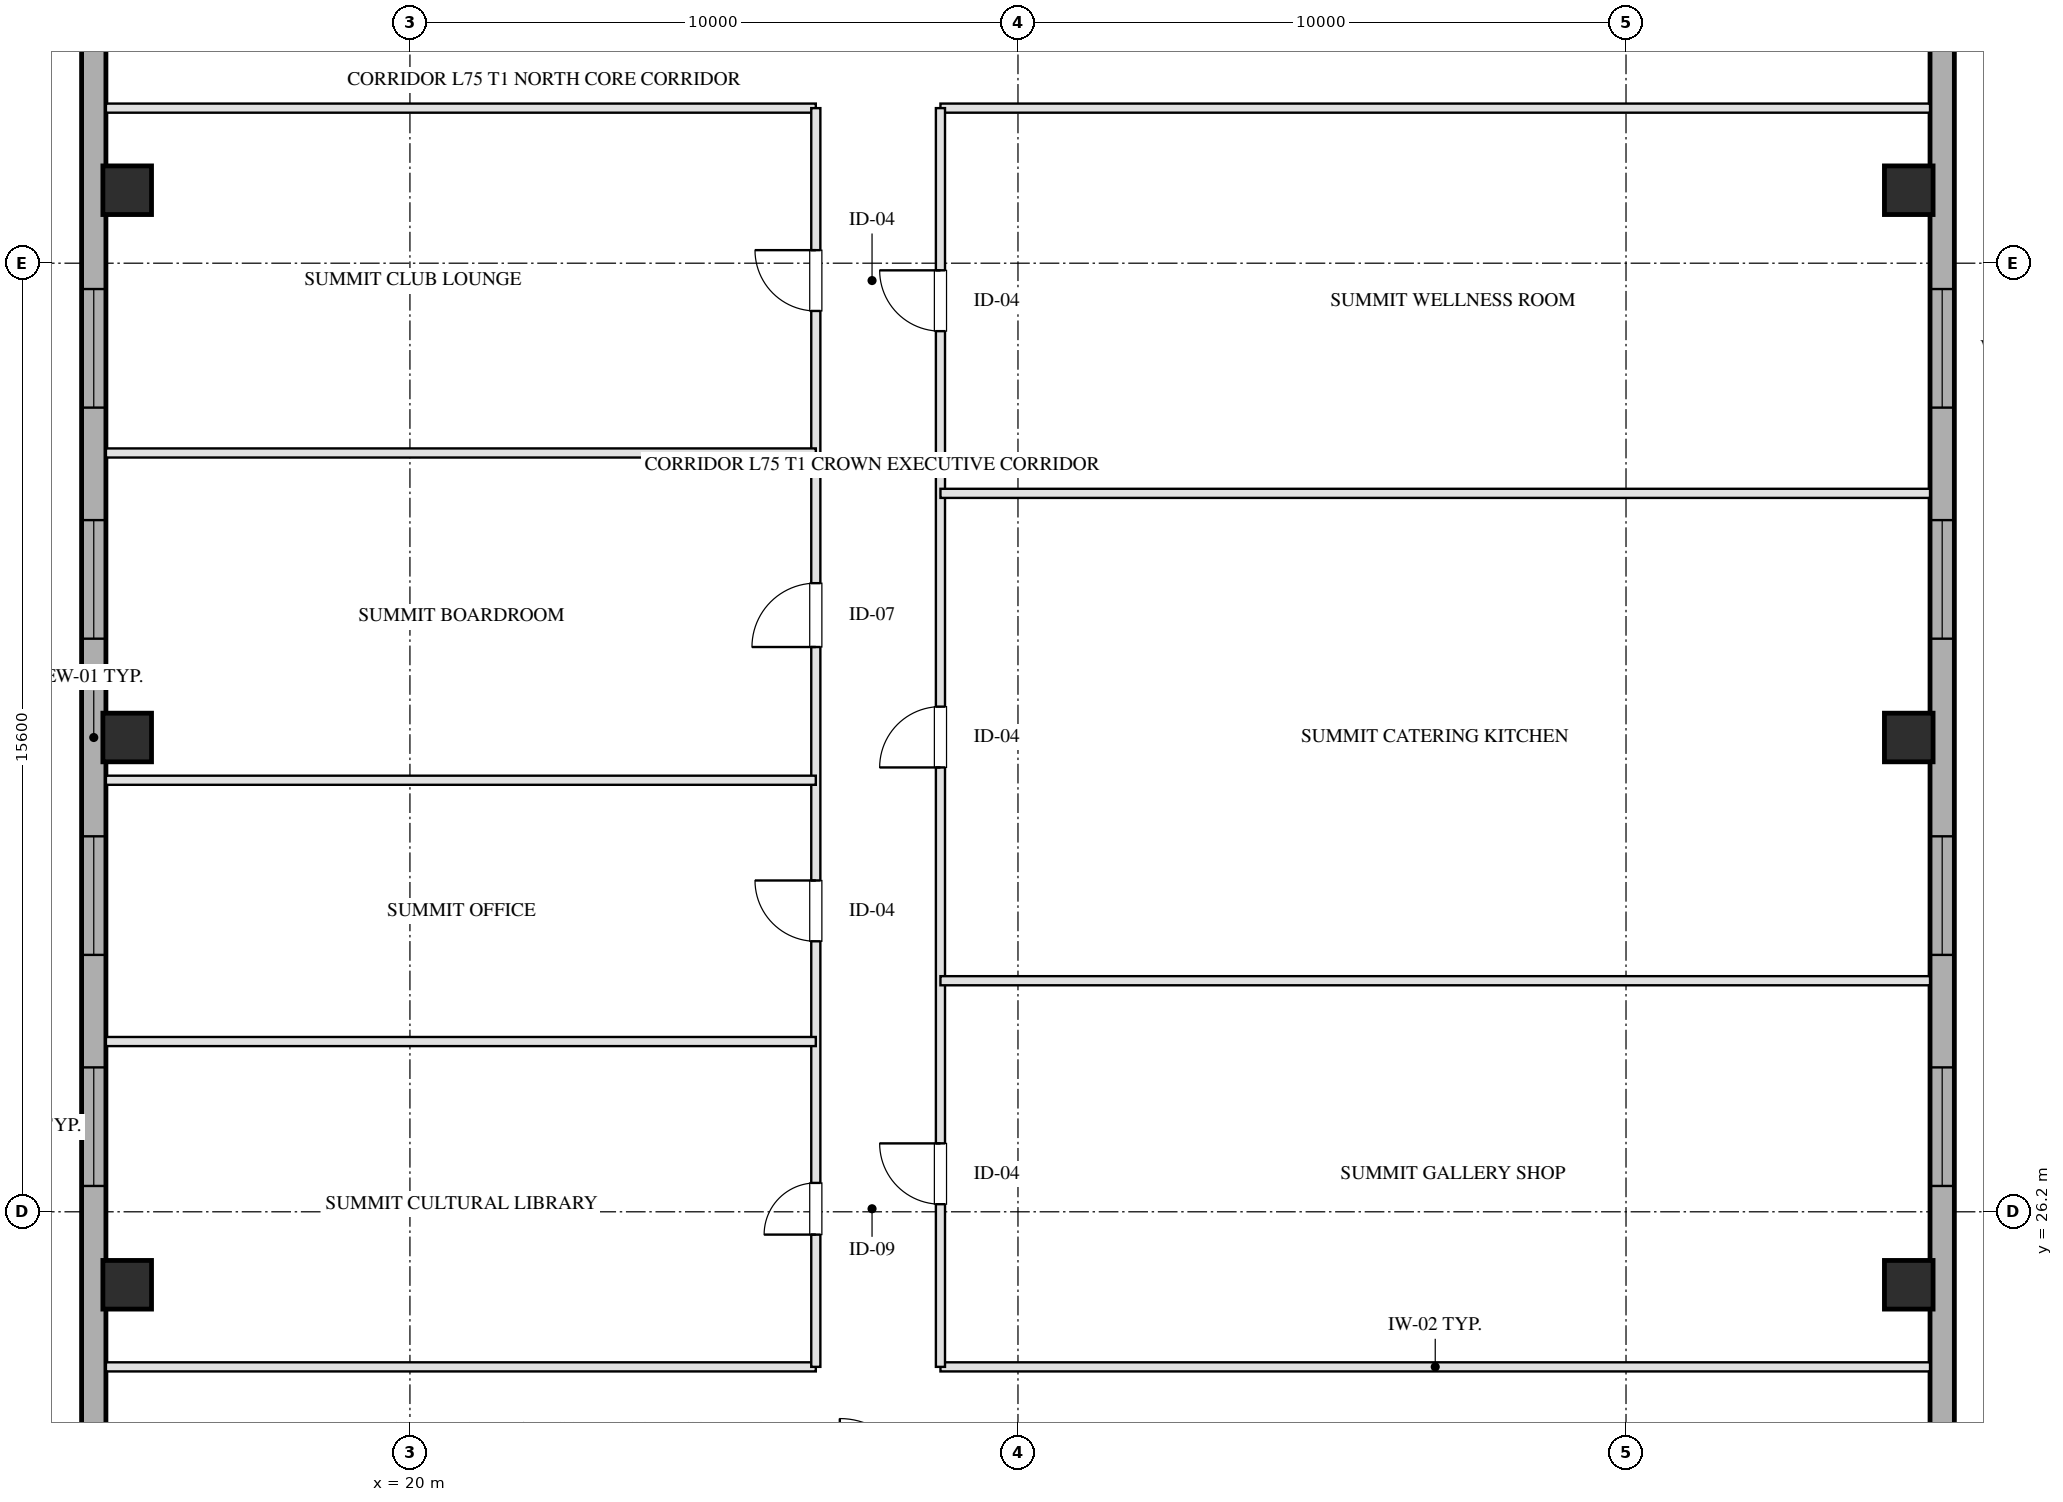
"""IFC4 building model, lengths in metres.
Left out: names, types, materials, properties, quantities, classifications, styles, units other than length and angle.
Written with IfcOpenShell. Run it as: python <this file> out.ifc"""

import sys

from ifc_helpers import new_model, si_unit, direction, frame, frame_2d, origin, origin_2d, place, context, subcontext, project, spatial, rectangle, hollow_rectangle, extrude, element, fill, save


model = new_model("IFC4")
c1 = context("Model", 3, precision=1e-05, world=origin(), true_north=direction((0.0, 1.0)))
c2 = subcontext(c1, "Body", "Model", "MODEL_VIEW")
j1 = project(units=[si_unit("LENGTHUNIT", "METRE"), si_unit("PLANEANGLEUNIT", "RADIAN")], contexts=[c1])
p1 = place(None, origin())
s1 = spatial("IfcSite", under=j1, at=p1, CompositionType="ELEMENT")
p2 = place(p1, origin())
s2 = spatial("IfcBuilding", under=s1, at=p2, CompositionType="ELEMENT")
p3 = place(p2, frame((0.0, 0.0, 272.8)))
s3 = spatial("IfcBuildingStorey", under=s2, at=p3, CompositionType="ELEMENT", Elevation=272.8)
for number, where, z_axis, x_axis in (
    (1, (15.35, 25.0, 0.0), (0.0, 0.0, 1.0), (1.0, 0.0, 0.0)),
    (2, (15.35, 34.0, 0.0), (0.0, 0.0, 1.0), (1.0, 0.0, 0.0)),
    (3, (15.35, 43.0, 0.0), (0.0, 0.0, 1.0), (1.0, 0.0, 0.0)),
    (4, (44.65, 25.0, 0.0), (0.0, 0.0, 1.0), (1.0, 0.0, 0.0)),
    (5, (44.65, 34.0, 0.0), (0.0, 0.0, 1.0), (1.0, 0.0, 0.0)),
    (6, (44.65, 43.0, 0.0), (0.0, 0.0, 1.0), (1.0, 0.0, 0.0)),
):
    element("IfcColumn", number, at=place(p3, frame(where, z_axis=z_axis, x_axis=x_axis)), inside=s3, PredefinedType="COLUMN", context=c2, shape_type="SweptSolid", body=[
        extrude(hollow_rectangle(XDim=0.8, YDim=0.8, WallThickness=0.028, at=origin_2d()), origin(), (0.0, 0.0, 1.0), 3.201),
    ])
p4 = place(p3, frame((14.8, 13.1, 0.0), z_axis=(0.0, 0.0, 1.0), x_axis=(0.0, 1.0, 0.0)))
e7 = element("IfcWall", 7, at=p4, inside=s3, PredefinedType="SOLIDWALL", context=c2, shape_type="SweptSolid", body=[
    extrude(rectangle(XDim=41.8, YDim=0.4, at=frame_2d((20.9, 0.0))), origin(), (0.0, 0.0, 1.0), 2.36),
])
p5 = place(p4, frame((13.525, 0.0, 0.75)))
e8 = element("IfcOpeningElement", 8, at=p5, cuts=e7, PredefinedType="OPENING", context=c2, shape_type="SweptSolid", body=[
    extrude(rectangle(XDim=1.95, YDim=1.21, at=frame_2d((0.975, 0.605))), frame((0.0, 0.21, 0.0), z_axis=(0.0, -1.0, 0.0), x_axis=(1.0, 0.0, 0.0)), (0.0, 0.0, 1.0), 0.42),
])
p6 = place(p4, frame((17.325, 0.0, 0.75)))
e9 = element("IfcOpeningElement", 9, at=p6, cuts=e7, PredefinedType="OPENING", context=c2, shape_type="SweptSolid", body=[
    extrude(rectangle(XDim=1.95, YDim=1.21, at=frame_2d((0.975, 0.605))), frame((0.0, 0.21, 0.0), z_axis=(0.0, -1.0, 0.0), x_axis=(1.0, 0.0, 0.0)), (0.0, 0.0, 1.0), 0.42),
])
p7 = place(p4, frame((22.525, 0.0, 0.75)))
e10 = element("IfcOpeningElement", 10, at=p7, cuts=e7, PredefinedType="OPENING", context=c2, shape_type="SweptSolid", body=[
    extrude(rectangle(XDim=1.95, YDim=1.21, at=frame_2d((0.975, 0.605))), frame((0.0, 0.21, 0.0), z_axis=(0.0, -1.0, 0.0), x_axis=(1.0, 0.0, 0.0)), (0.0, 0.0, 1.0), 0.42),
])
p8 = place(p4, frame((26.325, 0.0, 0.75)))
e11 = element("IfcOpeningElement", 11, at=p8, cuts=e7, PredefinedType="OPENING", context=c2, shape_type="SweptSolid", body=[
    extrude(rectangle(XDim=1.95, YDim=1.21, at=frame_2d((0.975, 0.605))), frame((0.0, 0.21, 0.0), z_axis=(0.0, -1.0, 0.0), x_axis=(1.0, 0.0, 0.0)), (0.0, 0.0, 1.0), 0.42),
])
p9 = place(p3, frame((45.2, 54.9, 0.0), z_axis=(0.0, 0.0, 1.0), x_axis=(0.0, -1.0, 0.0)))
e12 = element("IfcWall", 12, at=p9, inside=s3, PredefinedType="SOLIDWALL", context=c2, shape_type="SweptSolid", body=[
    extrude(rectangle(XDim=41.8, YDim=0.4, at=frame_2d((20.9, 0.0))), origin(), (0.0, 0.0, 1.0), 2.36),
])
p10 = place(p9, frame((26.325, 0.0, 0.75)))
e13 = element("IfcOpeningElement", 13, at=p10, cuts=e12, PredefinedType="OPENING", context=c2, shape_type="SweptSolid", body=[
    extrude(rectangle(XDim=1.95, YDim=1.21, at=frame_2d((0.975, 0.605))), frame((0.0, 0.21, 0.0), z_axis=(0.0, -1.0, 0.0), x_axis=(1.0, 0.0, 0.0)), (0.0, 0.0, 1.0), 0.42),
])
p11 = place(p9, frame((22.525, 0.0, 0.75)))
e14 = element("IfcOpeningElement", 14, at=p11, cuts=e12, PredefinedType="OPENING", context=c2, shape_type="SweptSolid", body=[
    extrude(rectangle(XDim=1.95, YDim=1.21, at=frame_2d((0.975, 0.605))), frame((0.0, 0.21, 0.0), z_axis=(0.0, -1.0, 0.0), x_axis=(1.0, 0.0, 0.0)), (0.0, 0.0, 1.0), 0.42),
])
p12 = place(p9, frame((17.325, 0.0, 0.75)))
e15 = element("IfcOpeningElement", 15, at=p12, cuts=e12, PredefinedType="OPENING", context=c2, shape_type="SweptSolid", body=[
    extrude(rectangle(XDim=1.95, YDim=1.21, at=frame_2d((0.975, 0.605))), frame((0.0, 0.21, 0.0), z_axis=(0.0, -1.0, 0.0), x_axis=(1.0, 0.0, 0.0)), (0.0, 0.0, 1.0), 0.42),
])
p13 = place(p9, frame((13.525, 0.0, 0.75)))
e16 = element("IfcOpeningElement", 16, at=p13, cuts=e12, PredefinedType="OPENING", context=c2, shape_type="SweptSolid", body=[
    extrude(rectangle(XDim=1.95, YDim=1.21, at=frame_2d((0.975, 0.605))), frame((0.0, 0.21, 0.0), z_axis=(0.0, -1.0, 0.0), x_axis=(1.0, 0.0, 0.0)), (0.0, 0.0, 1.0), 0.42),
])
p14 = place(p3, frame((15.0, 23.65, 0.0), z_axis=(0.0, 0.0, 1.0), x_axis=(1.0, 0.0, 0.0)))
e17 = element("IfcWall", 17, at=p14, inside=s3, PredefinedType="PARTITIONING", context=c2, shape_type="SweptSolid", body=[
    extrude(rectangle(XDim=11.675, YDim=0.15, at=frame_2d((5.837, 0.0))), origin(), (0.0, 0.0, 1.0), 2.925),
])
p15 = place(p3, frame((28.725, 23.65, 0.0), z_axis=(0.0, 0.0, 1.0), x_axis=(1.0, 0.0, 0.0)))
e18 = element("IfcWall", 18, at=p15, inside=s3, PredefinedType="PARTITIONING", context=c2, shape_type="SweptSolid", body=[
    extrude(rectangle(XDim=16.275, YDim=0.15, at=frame_2d((8.137, 0.0))), origin(), (0.0, 0.0, 1.0), 2.925),
])
p16 = place(p3, frame((15.0, 44.35, 0.0), z_axis=(0.0, 0.0, 1.0), x_axis=(1.0, 0.0, 0.0)))
e19 = element("IfcWall", 19, at=p16, inside=s3, PredefinedType="PARTITIONING", context=c2, shape_type="SweptSolid", body=[
    extrude(rectangle(XDim=11.675, YDim=0.15, at=frame_2d((5.837, 0.0))), origin(), (0.0, 0.0, 1.0), 2.925),
])
p17 = place(p3, frame((28.725, 44.35, 0.0), z_axis=(0.0, 0.0, 1.0), x_axis=(1.0, 0.0, 0.0)))
e20 = element("IfcWall", 20, at=p17, inside=s3, PredefinedType="PARTITIONING", context=c2, shape_type="SweptSolid", body=[
    extrude(rectangle(XDim=16.275, YDim=0.15, at=frame_2d((8.137, 0.0))), origin(), (0.0, 0.0, 1.0), 2.925),
])
p18 = place(p3, frame((26.675, 23.65, 0.0), z_axis=(0.0, 0.0, 1.0), x_axis=(0.0, 1.0, 0.0)))
e21 = element("IfcWall", 21, at=p18, inside=s3, PredefinedType="PARTITIONING", context=c2, shape_type="SweptSolid", body=[
    extrude(rectangle(XDim=20.7, YDim=0.15, at=frame_2d((10.35, 0.0))), origin(), (0.0, 0.0, 1.0), 2.925),
])
p19 = place(p18, frame((2.175, 0.0, 0.0)))
e22 = element("IfcOpeningElement", 22, at=p19, cuts=e21, PredefinedType="OPENING", context=c2, shape_type="SweptSolid", body=[
    extrude(rectangle(XDim=0.85, YDim=2.05, at=frame_2d((0.425, 1.025))), frame((0.0, 0.085, 0.0), z_axis=(0.0, -1.0, 0.0), x_axis=(1.0, 0.0, 0.0)), (0.0, 0.0, 1.0), 0.17),
])
p20 = place(p18, frame((6.999, 0.0, 0.0)))
e23 = element("IfcOpeningElement", 23, at=p20, cuts=e21, PredefinedType="OPENING", context=c2, shape_type="SweptSolid", body=[
    extrude(rectangle(XDim=1.0, YDim=2.05, at=frame_2d((0.5, 1.025))), frame((0.0, 0.085, 0.0), z_axis=(0.0, -1.0, 0.0), x_axis=(1.0, 0.0, 0.0)), (0.0, 0.0, 1.0), 0.17),
])
p21 = place(p18, frame((11.838, 0.0, 0.0)))
e24 = element("IfcOpeningElement", 24, at=p21, cuts=e21, PredefinedType="OPENING", context=c2, shape_type="SweptSolid", body=[
    extrude(rectangle(XDim=1.05, YDim=2.05, at=frame_2d((0.525, 1.025))), frame((0.0, 0.085, 0.0), z_axis=(0.0, -1.0, 0.0), x_axis=(1.0, 0.0, 0.0)), (0.0, 0.0, 1.0), 0.17),
])
p22 = place(p18, frame((17.365, 0.0, 0.0)))
e25 = element("IfcOpeningElement", 25, at=p22, cuts=e21, PredefinedType="OPENING", context=c2, shape_type="SweptSolid", body=[
    extrude(rectangle(XDim=1.0, YDim=2.05, at=frame_2d((0.5, 1.025))), frame((0.0, 0.085, 0.0), z_axis=(0.0, -1.0, 0.0), x_axis=(1.0, 0.0, 0.0)), (0.0, 0.0, 1.0), 0.17),
])
p23 = place(p3, frame((28.725, 23.65, 0.0), z_axis=(0.0, 0.0, 1.0), x_axis=(0.0, 1.0, 0.0)))
e26 = element("IfcWall", 26, at=p23, inside=s3, PredefinedType="PARTITIONING", context=c2, shape_type="SweptSolid", body=[
    extrude(rectangle(XDim=20.7, YDim=0.15, at=frame_2d((10.35, 0.0))), origin(), (0.0, 0.0, 1.0), 2.925),
])
p24 = place(p23, frame((2.675, 0.0, 0.0)))
e27 = element("IfcOpeningElement", 27, at=p24, cuts=e26, PredefinedType="OPENING", context=c2, shape_type="SweptSolid", body=[
    extrude(rectangle(XDim=1.0, YDim=2.05, at=frame_2d((0.5, 1.025))), frame((0.0, 0.085, 0.0), z_axis=(0.0, -1.0, 0.0), x_axis=(1.0, 0.0, 0.0)), (0.0, 0.0, 1.0), 0.17),
])
p25 = place(p23, frame((9.857, 0.0, 0.0)))
e28 = element("IfcOpeningElement", 28, at=p25, cuts=e26, PredefinedType="OPENING", context=c2, shape_type="SweptSolid", body=[
    extrude(rectangle(XDim=1.0, YDim=2.05, at=frame_2d((0.5, 1.025))), frame((0.0, 0.085, 0.0), z_axis=(0.0, -1.0, 0.0), x_axis=(1.0, 0.0, 0.0)), (0.0, 0.0, 1.0), 0.17),
])
p26 = place(p23, frame((17.032, 0.0, 0.0)))
e29 = element("IfcOpeningElement", 29, at=p26, cuts=e26, PredefinedType="OPENING", context=c2, shape_type="SweptSolid", body=[
    extrude(rectangle(XDim=1.0, YDim=2.05, at=frame_2d((0.5, 1.025))), frame((0.0, 0.085, 0.0), z_axis=(0.0, -1.0, 0.0), x_axis=(1.0, 0.0, 0.0)), (0.0, 0.0, 1.0), 0.17),
])
for number, where, z_axis, x_axis in (
    (30, (15.0, 29.0, 0.0), (0.0, 0.0, 1.0), (1.0, 0.0, 0.0)),
    (31, (15.0, 33.297, 0.0), (0.0, 0.0, 1.0), (1.0, 0.0, 0.0)),
    (32, (15.0, 38.679, 0.0), (0.0, 0.0, 1.0), (1.0, 0.0, 0.0)),
):
    element("IfcWall", number, at=place(p3, frame(where, z_axis=z_axis, x_axis=x_axis)), inside=s3, PredefinedType="PARTITIONING", context=c2, shape_type="SweptSolid", body=[
        extrude(rectangle(XDim=11.675, YDim=0.15, at=frame_2d((5.837, 0.0))), origin(), (0.0, 0.0, 1.0), 2.925),
    ])
for number, where, z_axis, x_axis in (
    (33, (28.725, 30.0, 0.0), (0.0, 0.0, 1.0), (1.0, 0.0, 0.0)),
    (34, (28.725, 38.015, 0.0), (0.0, 0.0, 1.0), (1.0, 0.0, 0.0)),
):
    element("IfcWall", number, at=place(p3, frame(where, z_axis=z_axis, x_axis=x_axis)), inside=s3, PredefinedType="PARTITIONING", context=c2, shape_type="SweptSolid", body=[
        extrude(rectangle(XDim=16.275, YDim=0.15, at=frame_2d((8.137, 0.0))), origin(), (0.0, 0.0, 1.0), 2.925),
    ])
p27 = place(p5, origin())
e35 = element("IfcWindow", 35, at=p27, inside=s3, PartitioningType="TRIPLE_PANEL_VERTICAL", PredefinedType="WINDOW", context=c2, shape_type="SweptSolid", body=[
    extrude(rectangle(XDim=1.95, YDim=1.21, at=frame_2d((0.975, 0.605))), frame((0.0, 0.03, 0.0), z_axis=(0.0, -1.0, 0.0), x_axis=(1.0, 0.0, 0.0)), (0.0, 0.0, 1.0), 0.06),
])
fill(e8, e35)
p28 = place(p6, origin())
e36 = element("IfcWindow", 36, at=p28, inside=s3, PartitioningType="TRIPLE_PANEL_VERTICAL", PredefinedType="WINDOW", context=c2, shape_type="SweptSolid", body=[
    extrude(rectangle(XDim=1.95, YDim=1.21, at=frame_2d((0.975, 0.605))), frame((0.0, 0.03, 0.0), z_axis=(0.0, -1.0, 0.0), x_axis=(1.0, 0.0, 0.0)), (0.0, 0.0, 1.0), 0.06),
])
fill(e9, e36)
p29 = place(p7, origin())
e37 = element("IfcWindow", 37, at=p29, inside=s3, PartitioningType="TRIPLE_PANEL_VERTICAL", PredefinedType="WINDOW", context=c2, shape_type="SweptSolid", body=[
    extrude(rectangle(XDim=1.95, YDim=1.21, at=frame_2d((0.975, 0.605))), frame((0.0, 0.03, 0.0), z_axis=(0.0, -1.0, 0.0), x_axis=(1.0, 0.0, 0.0)), (0.0, 0.0, 1.0), 0.06),
])
fill(e10, e37)
p30 = place(p8, origin())
e38 = element("IfcWindow", 38, at=p30, inside=s3, PartitioningType="TRIPLE_PANEL_VERTICAL", PredefinedType="WINDOW", context=c2, shape_type="SweptSolid", body=[
    extrude(rectangle(XDim=1.95, YDim=1.21, at=frame_2d((0.975, 0.605))), frame((0.0, 0.03, 0.0), z_axis=(0.0, -1.0, 0.0), x_axis=(1.0, 0.0, 0.0)), (0.0, 0.0, 1.0), 0.06),
])
fill(e11, e38)
p31 = place(p10, origin())
e39 = element("IfcWindow", 39, at=p31, inside=s3, PartitioningType="TRIPLE_PANEL_VERTICAL", PredefinedType="WINDOW", context=c2, shape_type="SweptSolid", body=[
    extrude(rectangle(XDim=1.95, YDim=1.21, at=frame_2d((0.975, 0.605))), frame((0.0, 0.03, 0.0), z_axis=(0.0, -1.0, 0.0), x_axis=(1.0, 0.0, 0.0)), (0.0, 0.0, 1.0), 0.06),
])
fill(e13, e39)
p32 = place(p11, origin())
e40 = element("IfcWindow", 40, at=p32, inside=s3, PartitioningType="TRIPLE_PANEL_VERTICAL", PredefinedType="WINDOW", context=c2, shape_type="SweptSolid", body=[
    extrude(rectangle(XDim=1.95, YDim=1.21, at=frame_2d((0.975, 0.605))), frame((0.0, 0.03, 0.0), z_axis=(0.0, -1.0, 0.0), x_axis=(1.0, 0.0, 0.0)), (0.0, 0.0, 1.0), 0.06),
])
fill(e14, e40)
p33 = place(p12, origin())
e41 = element("IfcWindow", 41, at=p33, inside=s3, PartitioningType="TRIPLE_PANEL_VERTICAL", PredefinedType="WINDOW", context=c2, shape_type="SweptSolid", body=[
    extrude(rectangle(XDim=1.95, YDim=1.21, at=frame_2d((0.975, 0.605))), frame((0.0, 0.03, 0.0), z_axis=(0.0, -1.0, 0.0), x_axis=(1.0, 0.0, 0.0)), (0.0, 0.0, 1.0), 0.06),
])
fill(e15, e41)
p34 = place(p13, origin())
e42 = element("IfcWindow", 42, at=p34, inside=s3, PartitioningType="TRIPLE_PANEL_VERTICAL", PredefinedType="WINDOW", context=c2, shape_type="SweptSolid", body=[
    extrude(rectangle(XDim=1.95, YDim=1.21, at=frame_2d((0.975, 0.605))), frame((0.0, 0.03, 0.0), z_axis=(0.0, -1.0, 0.0), x_axis=(1.0, 0.0, 0.0)), (0.0, 0.0, 1.0), 0.06),
])
fill(e16, e42)
p35 = place(p19, origin())
e43 = element("IfcDoor", 43, at=p35, inside=s3, OperationType="SINGLE_SWING_LEFT", PredefinedType="DOOR", context=c2, shape_type="SweptSolid", body=[
    extrude(rectangle(XDim=0.85, YDim=2.05, at=frame_2d((0.425, 1.025))), frame((0.0, 0.025, 0.0), z_axis=(0.0, -1.0, 0.0), x_axis=(1.0, 0.0, 0.0)), (0.0, 0.0, 1.0), 0.05),
])
fill(e22, e43)
p36 = place(p20, origin())
e44 = element("IfcDoor", 44, at=p36, inside=s3, OperationType="SINGLE_SWING_RIGHT", PredefinedType="DOOR", context=c2, shape_type="SweptSolid", body=[
    extrude(rectangle(XDim=1.0, YDim=2.05, at=frame_2d((0.5, 1.025))), frame((0.0, 0.025, 0.0), z_axis=(0.0, -1.0, 0.0), x_axis=(1.0, 0.0, 0.0)), (0.0, 0.0, 1.0), 0.05),
])
fill(e23, e44)
p37 = place(p21, origin())
e45 = element("IfcDoor", 45, at=p37, inside=s3, OperationType="SINGLE_SWING_LEFT", PredefinedType="DOOR", context=c2, shape_type="SweptSolid", body=[
    extrude(rectangle(XDim=1.05, YDim=2.05, at=frame_2d((0.525, 1.025))), frame((0.0, 0.025, 0.0), z_axis=(0.0, -1.0, 0.0), x_axis=(1.0, 0.0, 0.0)), (0.0, 0.0, 1.0), 0.05),
])
fill(e24, e45)
p38 = place(p22, origin())
e46 = element("IfcDoor", 46, at=p38, inside=s3, OperationType="SINGLE_SWING_RIGHT", PredefinedType="DOOR", context=c2, shape_type="SweptSolid", body=[
    extrude(rectangle(XDim=1.0, YDim=2.05, at=frame_2d((0.5, 1.025))), frame((0.0, 0.025, 0.0), z_axis=(0.0, -1.0, 0.0), x_axis=(1.0, 0.0, 0.0)), (0.0, 0.0, 1.0), 0.05),
])
fill(e25, e46)
p39 = place(p24, origin())
e47 = element("IfcDoor", 47, at=p39, inside=s3, OperationType="SINGLE_SWING_RIGHT", PredefinedType="DOOR", context=c2, shape_type="SweptSolid", body=[
    extrude(rectangle(XDim=1.0, YDim=2.05, at=frame_2d((0.5, 1.025))), frame((0.0, 0.025, 0.0), z_axis=(0.0, -1.0, 0.0), x_axis=(1.0, 0.0, 0.0)), (0.0, 0.0, 1.0), 0.05),
])
fill(e27, e47)
p40 = place(p25, origin())
e48 = element("IfcDoor", 48, at=p40, inside=s3, OperationType="SINGLE_SWING_LEFT", PredefinedType="DOOR", context=c2, shape_type="SweptSolid", body=[
    extrude(rectangle(XDim=1.0, YDim=2.05, at=frame_2d((0.5, 1.025))), frame((0.0, 0.025, 0.0), z_axis=(0.0, -1.0, 0.0), x_axis=(1.0, 0.0, 0.0)), (0.0, 0.0, 1.0), 0.05),
])
fill(e28, e48)
p41 = place(p26, origin())
e49 = element("IfcDoor", 49, at=p41, inside=s3, OperationType="SINGLE_SWING_RIGHT", PredefinedType="DOOR", context=c2, shape_type="SweptSolid", body=[
    extrude(rectangle(XDim=1.0, YDim=2.05, at=frame_2d((0.5, 1.025))), frame((0.0, 0.025, 0.0), z_axis=(0.0, -1.0, 0.0), x_axis=(1.0, 0.0, 0.0)), (0.0, 0.0, 1.0), 0.05),
])
fill(e29, e49)
save(model, sys.argv[1])
